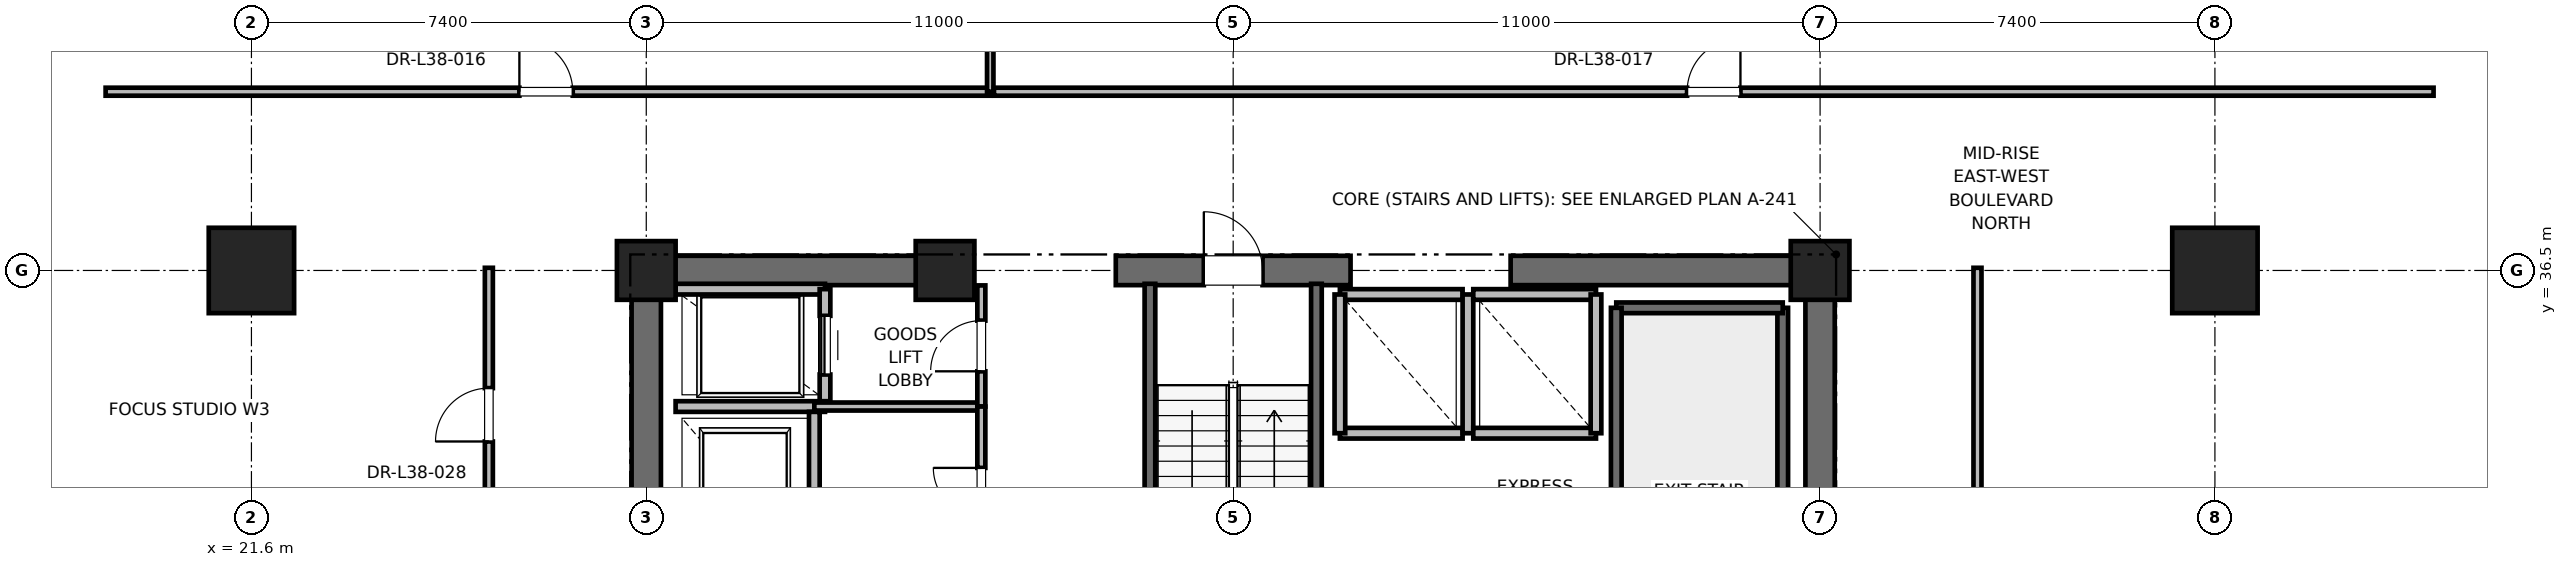
"""IFC4 building model, lengths in metres.
Left out: names, types, materials, properties, quantities, classifications, styles, units other than length and angle.
Written with IfcOpenShell. Run it as: python <this file> out.ifc"""

import sys

from ifc_helpers import new_model, si_unit, direction, frame, frame_2d, origin, origin_2d, place, context, subcontext, project, spatial, rectangle, extrude, element, fill, save


model = new_model("IFC4")
c1 = context("Model", 3, precision=1e-05, world=origin(), true_north=direction((0.0, 1.0)))
c2 = subcontext(c1, "Body", "Model", "MODEL_VIEW")
j1 = project(units=[si_unit("LENGTHUNIT", "METRE"), si_unit("PLANEANGLEUNIT", "RADIAN")], contexts=[c1])
p1 = place(None, origin())
s1 = spatial("IfcSite", under=j1, at=p1, CompositionType="ELEMENT")
p2 = place(p1, origin())
s2 = spatial("IfcBuilding", under=s1, at=p2, CompositionType="ELEMENT")
p3 = place(p2, frame((0.0, 0.0, 164.4)))
s3 = spatial("IfcBuildingStorey", under=s2, at=p3, CompositionType="ELEMENT", Elevation=164.4)
for number, where, z_axis, x_axis in (
    (1, (21.6, 36.5, 0.0), (0.0, 0.0, 1.0), (1.0, 0.0, 0.0)),
    (2, (58.4, 36.5, 0.0), (0.0, 0.0, 1.0), (1.0, 0.0, 0.0)),
):
    element("IfcColumn", number, at=place(p3, frame(where, z_axis=z_axis, x_axis=x_axis)), inside=s3, PredefinedType="COLUMN", context=c2, shape_type="SweptSolid", body=[
        extrude(rectangle(XDim=1.6, YDim=1.6, at=origin_2d()), origin(), (0.0, 0.0, 1.0), 4.0),
    ])
for number, where, z_axis, x_axis in (
    (3, (29.0, 36.5, 0.0), (0.0, 0.0, 1.0), (1.0, 0.0, 0.0)),
    (4, (51.0, 36.5, 0.0), (0.0, 0.0, 1.0), (1.0, 0.0, 0.0)),
    (5, (34.6, 36.5, 0.0), (0.0, 0.0, 1.0), (1.0, 0.0, 0.0)),
):
    element("IfcColumn", number, at=place(p3, frame(where, z_axis=z_axis, x_axis=x_axis)), inside=s3, PredefinedType="PILASTER", context=c2, shape_type="SweptSolid", body=[
        extrude(rectangle(XDim=1.1, YDim=1.1, at=origin_2d()), origin(), (0.0, 0.0, 1.0), 4.0),
    ])
p4 = place(p3, frame((29.0, 36.5, 0.0), z_axis=(0.0, 0.0, 1.0), x_axis=(1.0, 0.0, 0.0)))
e6 = element("IfcWall", 6, at=p4, inside=s3, PredefinedType="SHEAR", context=c2, shape_type="SweptSolid", body=[
    extrude(rectangle(XDim=5.8, YDim=0.55, at=frame_2d((2.9, 0.0))), origin(), (0.0, 0.0, 1.0), 3.775),
])
p5 = place(p3, frame((37.8, 36.5, 0.0), z_axis=(0.0, 0.0, 1.0), x_axis=(1.0, 0.0, 0.0)))
e7 = element("IfcWall", 7, at=p5, inside=s3, PredefinedType="SHEAR", context=c2, shape_type="SweptSolid", body=[
    extrude(rectangle(XDim=4.4, YDim=0.55, at=frame_2d((2.2, 0.0))), origin(), (0.0, 0.0, 1.0), 3.775),
])
p6 = place(p5, frame((1.65, 0.0, 0.0)))
e8 = element("IfcOpeningElement", 8, at=p6, cuts=e7, PredefinedType="OPENING", context=c2, shape_type="SweptSolid", body=[
    extrude(rectangle(XDim=1.1, YDim=2.15, at=frame_2d((0.55, 1.075))), frame((0.0, 0.275, 0.0), z_axis=(0.0, -1.0, 0.0), x_axis=(1.0, 0.0, 0.0)), (0.0, 0.0, 1.0), 0.55),
])
for number, where, z_axis, x_axis in (
    (9, (45.2, 36.5, 0.0), (0.0, 0.0, 1.0), (1.0, 0.0, 0.0)),
    (10, (29.0, 30.7, 0.0), (0.0, 0.0, 1.0), (0.0, 1.0, 0.0)),
):
    element("IfcWall", number, at=place(p3, frame(where, z_axis=z_axis, x_axis=x_axis)), inside=s3, PredefinedType="SHEAR", context=c2, shape_type="SweptSolid", body=[
        extrude(rectangle(XDim=5.8, YDim=0.55, at=frame_2d((2.9, 0.0))), origin(), (0.0, 0.0, 1.0), 3.775),
    ])
p7 = place(p3, frame((51.0, 27.7, 0.0), z_axis=(0.0, 0.0, 1.0), x_axis=(0.0, 1.0, 0.0)))
e11 = element("IfcWall", 11, at=p7, inside=s3, PredefinedType="SHEAR", context=c2, shape_type="SweptSolid", body=[
    extrude(rectangle(XDim=8.8, YDim=0.55, at=frame_2d((4.4, 0.0))), origin(), (0.0, 0.0, 1.0), 3.775),
])
p8 = place(p3, frame((50.3, 27.65, 0.0), z_axis=(0.0, 0.0, 1.0), x_axis=(0.0, 1.0, 0.0)))
e12 = element("IfcWall", 12, at=p8, inside=s3, PredefinedType="SOLIDWALL", context=c2, shape_type="SweptSolid", body=[
    extrude(rectangle(XDim=8.15, YDim=0.2, at=frame_2d((4.075, 0.0))), origin(), (0.0, 0.0, 1.0), 3.775),
])
p9 = place(p3, frame((47.18, 35.8, 0.0), z_axis=(0.0, 0.0, 1.0), x_axis=(1.0, 0.0, 0.0)))
e13 = element("IfcWall", 13, at=p9, inside=s3, PredefinedType="SOLIDWALL", context=c2, shape_type="SweptSolid", body=[
    extrude(rectangle(XDim=3.12, YDim=0.2, at=frame_2d((1.56, 0.0))), origin(), (0.0, 0.0, 1.0), 3.775),
])
p10 = place(p3, frame((47.18, 27.62, 0.0), z_axis=(0.0, 0.0, 1.0), x_axis=(0.0, 1.0, 0.0)))
e14 = element("IfcWall", 14, at=p10, inside=s3, PredefinedType="SOLIDWALL", context=c2, shape_type="SweptSolid", body=[
    extrude(rectangle(XDim=8.18, YDim=0.2, at=frame_2d((4.09, 0.0))), origin(), (0.0, 0.0, 1.0), 3.775),
])
p11 = place(p3, frame((38.44, 27.38, 0.0), z_axis=(0.0, 0.0, 1.0), x_axis=(0.0, 1.0, 0.0)))
e15 = element("IfcWall", 15, at=p11, inside=s3, PredefinedType="SOLIDWALL", context=c2, shape_type="SweptSolid", body=[
    extrude(rectangle(XDim=8.87, YDim=0.2, at=frame_2d((4.435, 0.0))), origin(), (0.0, 0.0, 1.0), 3.775),
])
p12 = place(p3, frame((41.56, 27.68, 0.0), z_axis=(0.0, 0.0, 1.0), x_axis=(0.0, 1.0, 0.0)))
e16 = element("IfcWall", 16, at=p12, inside=s3, PredefinedType="SOLIDWALL", context=c2, shape_type="SweptSolid", body=[
    extrude(rectangle(XDim=8.57, YDim=0.2, at=frame_2d((4.285, 0.0))), origin(), (0.0, 0.0, 1.0), 3.775),
])
p13 = place(p3, frame((29.55, 33.95, 0.0), z_axis=(0.0, 0.0, 1.0), x_axis=(1.0, 0.0, 0.0)))
e17 = element("IfcWall", 17, at=p13, inside=s3, PredefinedType="SOLIDWALL", context=c2, shape_type="SweptSolid", body=[
    extrude(rectangle(XDim=2.8, YDim=0.2, at=frame_2d((1.4, 0.0))), origin(), (0.0, 0.0, 1.0), 3.775),
])
p14 = place(p3, frame((32.15, 30.85, 0.0), z_axis=(0.0, 0.0, 1.0), x_axis=(0.0, 1.0, 0.0)))
e18 = element("IfcWall", 18, at=p14, inside=s3, PredefinedType="SOLIDWALL", context=c2, shape_type="SweptSolid", body=[
    extrude(rectangle(XDim=3.0, YDim=0.2, at=frame_2d((1.5, 0.0))), origin(), (0.0, 0.0, 1.0), 3.775),
])
p15 = place(p3, frame((32.35, 36.15, 0.0), z_axis=(0.0, 0.0, 1.0), x_axis=(-1.0, 0.0, 0.0)))
e19 = element("IfcWall", 19, at=p15, inside=s3, PredefinedType="SOLIDWALL", context=c2, shape_type="SweptSolid", body=[
    extrude(rectangle(XDim=2.8, YDim=0.2, at=frame_2d((1.4, 0.0))), origin(), (0.0, 0.0, 1.0), 2.985),
])
p16 = place(p3, frame((32.35, 34.05, 0.0), z_axis=(0.0, 0.0, 1.0), x_axis=(0.0, 1.0, 0.0)))
e20 = element("IfcWall", 20, at=p16, inside=s3, PredefinedType="SOLIDWALL", context=c2, shape_type="SweptSolid", body=[
    extrude(rectangle(XDim=2.1, YDim=0.2, at=frame_2d((1.05, 0.0))), origin(), (0.0, 0.0, 1.0), 3.775),
])
p17 = place(p16, frame((0.5, 0.0, 0.0)))
e21 = element("IfcOpeningElement", 21, at=p17, cuts=e20, PredefinedType="OPENING", context=c2, shape_type="SweptSolid", body=[
    extrude(rectangle(XDim=1.1, YDim=2.2, at=frame_2d((0.55, 1.1))), frame((0.0, 0.1, 0.0), z_axis=(0.0, -1.0, 0.0), x_axis=(1.0, 0.0, 0.0)), (0.0, 0.0, 1.0), 0.2),
])
p18 = place(p3, frame((42.0, 33.45, 0.0), z_axis=(0.0, 0.0, 1.0), x_axis=(1.0, 0.0, 0.0)))
e22 = element("IfcWall", 22, at=p18, inside=s3, PredefinedType="SOLIDWALL", context=c2, shape_type="SweptSolid", body=[
    extrude(rectangle(XDim=2.3, YDim=0.2, at=frame_2d((1.15, 0.0))), origin(), (0.0, 0.0, 1.0), 3.775),
])
p19 = place(p3, frame((44.3, 36.05, 0.0), z_axis=(0.0, 0.0, 1.0), x_axis=(-1.0, 0.0, 0.0)))
e23 = element("IfcWall", 23, at=p19, inside=s3, PredefinedType="SOLIDWALL", context=c2, shape_type="SweptSolid", body=[
    extrude(rectangle(XDim=2.3, YDim=0.2, at=frame_2d((1.15, 0.0))), origin(), (0.0, 0.0, 1.0), 2.755),
])
for number, where, z_axis, x_axis in (
    (24, (42.0, 36.05, 0.0), (0.0, 0.0, 1.0), (0.0, -1.0, 0.0)),
    (25, (44.4, 33.45, 0.0), (0.0, 0.0, 1.0), (0.0, 1.0, 0.0)),
):
    element("IfcWall", number, at=place(p3, frame(where, z_axis=z_axis, x_axis=x_axis)), inside=s3, PredefinedType="SOLIDWALL", context=c2, shape_type="SweptSolid", body=[
        extrude(rectangle(XDim=2.6, YDim=0.2, at=frame_2d((1.3, 0.0))), origin(), (0.0, 0.0, 1.0), 2.755),
    ])
p20 = place(p3, frame((44.5, 33.45, 0.0), z_axis=(0.0, 0.0, 1.0), x_axis=(1.0, 0.0, 0.0)))
e26 = element("IfcWall", 26, at=p20, inside=s3, PredefinedType="SOLIDWALL", context=c2, shape_type="SweptSolid", body=[
    extrude(rectangle(XDim=2.3, YDim=0.2, at=frame_2d((1.15, 0.0))), origin(), (0.0, 0.0, 1.0), 3.775),
])
p21 = place(p3, frame((46.8, 36.05, 0.0), z_axis=(0.0, 0.0, 1.0), x_axis=(-1.0, 0.0, 0.0)))
e27 = element("IfcWall", 27, at=p21, inside=s3, PredefinedType="SOLIDWALL", context=c2, shape_type="SweptSolid", body=[
    extrude(rectangle(XDim=2.3, YDim=0.2, at=frame_2d((1.15, 0.0))), origin(), (0.0, 0.0, 1.0), 2.755),
])
p22 = place(p3, frame((46.8, 33.45, 0.0), z_axis=(0.0, 0.0, 1.0), x_axis=(0.0, 1.0, 0.0)))
e28 = element("IfcWall", 28, at=p22, inside=s3, PredefinedType="SOLIDWALL", context=c2, shape_type="SweptSolid", body=[
    extrude(rectangle(XDim=2.6, YDim=0.2, at=frame_2d((1.3, 0.0))), origin(), (0.0, 0.0, 1.0), 3.775),
])
p23 = place(p3, frame((32.15, 33.95, 0.0), z_axis=(0.0, 0.0, 1.0), x_axis=(1.0, 0.0, 0.0)))
e29 = element("IfcWall", 29, at=p23, inside=s3, PredefinedType="PARTITIONING", context=c2, shape_type="SweptSolid", body=[
    extrude(rectangle(XDim=3.13, YDim=0.15, at=frame_2d((1.565, 0.0))), origin(), (0.0, 0.0, 1.0), 2.85),
])
p24 = place(p3, frame((35.28, 33.95, 0.0), z_axis=(0.0, 0.0, 1.0), x_axis=(0.0, 1.0, 0.0)))
e30 = element("IfcWall", 30, at=p24, inside=s3, PredefinedType="PARTITIONING", context=c2, shape_type="SweptSolid", body=[
    extrude(rectangle(XDim=2.27, YDim=0.15, at=frame_2d((1.135, 0.0))), origin(), (0.0, 0.0, 1.0), 2.755),
])
p25 = place(p24, frame((0.66, 0.0, 0.0)))
e31 = element("IfcOpeningElement", 31, at=p25, cuts=e30, PredefinedType="OPENING", context=c2, shape_type="SweptSolid", body=[
    extrude(rectangle(XDim=0.95, YDim=2.15, at=frame_2d((0.475, 1.075))), frame((0.0, 0.075, 0.0), z_axis=(0.0, -1.0, 0.0), x_axis=(1.0, 0.0, 0.0)), (0.0, 0.0, 1.0), 0.15),
])
p26 = place(p3, frame((35.28, 30.75, 0.0), z_axis=(0.0, 0.0, 1.0), x_axis=(0.0, 1.0, 0.0)))
e32 = element("IfcWall", 32, at=p26, inside=s3, PredefinedType="PARTITIONING", context=c2, shape_type="SweptSolid", body=[
    extrude(rectangle(XDim=3.2, YDim=0.15, at=frame_2d((1.6, 0.0))), origin(), (0.0, 0.0, 1.0), 2.85),
])
p27 = place(p26, frame((1.15, 0.0, 0.0)))
e33 = element("IfcOpeningElement", 33, at=p27, cuts=e32, PredefinedType="OPENING", context=c2, shape_type="SweptSolid", body=[
    extrude(rectangle(XDim=0.9, YDim=2.1, at=frame_2d((0.45, 1.05))), frame((0.0, 0.075, 0.0), z_axis=(0.0, -1.0, 0.0), x_axis=(1.0, 0.0, 0.0)), (0.0, 0.0, 1.0), 0.15),
])
p28 = place(p3, frame((18.867, 39.85, 0.0), z_axis=(0.0, 0.0, 1.0), x_axis=(1.0, 0.0, 0.0)))
e34 = element("IfcWall", 34, at=p28, inside=s3, PredefinedType="PARTITIONING", context=c2, shape_type="SweptSolid", body=[
    extrude(rectangle(XDim=16.58, YDim=0.15, at=frame_2d((8.29, 0.0))), origin(), (0.0, 0.0, 1.0), 2.85),
])
p29 = place(p28, frame((7.755, 0.0, 0.0)))
e35 = element("IfcOpeningElement", 35, at=p29, cuts=e34, PredefinedType="OPENING", context=c2, shape_type="SweptSolid", body=[
    extrude(rectangle(XDim=1.0, YDim=2.15, at=frame_2d((0.5, 1.075))), frame((0.0, 0.075, 0.0), z_axis=(0.0, -1.0, 0.0), x_axis=(1.0, 0.0, 0.0)), (0.0, 0.0, 1.0), 0.15),
])
p30 = place(p3, frame((35.447, 39.85, 0.0), z_axis=(0.0, 0.0, 1.0), x_axis=(0.0, 1.0, 0.0)))
e36 = element("IfcWall", 36, at=p30, inside=s3, PredefinedType="PARTITIONING", context=c2, shape_type="SweptSolid", body=[
    extrude(rectangle(XDim=9.523, YDim=0.12, at=frame_2d((4.761, 0.0))), origin(), (0.0, 0.0, 1.0), 2.405),
])
p31 = place(p3, frame((35.517, 39.85, 0.0), z_axis=(0.0, 0.0, 1.0), x_axis=(1.0, 0.0, 0.0)))
e37 = element("IfcWall", 37, at=p31, inside=s3, PredefinedType="PARTITIONING", context=c2, shape_type="SweptSolid", body=[
    extrude(rectangle(XDim=26.981, YDim=0.15, at=frame_2d((13.491, 0.0))), origin(), (0.0, 0.0, 1.0), 2.85),
])
p32 = place(p31, frame((12.99, 0.0, 0.0)))
e38 = element("IfcOpeningElement", 38, at=p32, cuts=e37, PredefinedType="OPENING", context=c2, shape_type="SweptSolid", body=[
    extrude(rectangle(XDim=1.0, YDim=2.15, at=frame_2d((0.5, 1.075))), frame((0.0, 0.075, 0.0), z_axis=(0.0, -1.0, 0.0), x_axis=(1.0, 0.0, 0.0)), (0.0, 0.0, 1.0), 0.15),
])
p33 = place(p3, frame((26.05, 31.19, 0.0), z_axis=(0.0, 0.0, 1.0), x_axis=(0.0, 1.0, 0.0)))
e39 = element("IfcWall", 39, at=p33, inside=s3, PredefinedType="PARTITIONING", context=c2, shape_type="SweptSolid", body=[
    extrude(rectangle(XDim=5.36, YDim=0.15, at=frame_2d((2.68, 0.0))), origin(), (0.0, 0.0, 1.0), 2.85),
])
p34 = place(p33, frame((2.105, 0.0, 0.0)))
e40 = element("IfcOpeningElement", 40, at=p34, cuts=e39, PredefinedType="OPENING", context=c2, shape_type="SweptSolid", body=[
    extrude(rectangle(XDim=1.0, YDim=2.15, at=frame_2d((0.5, 1.075))), frame((0.0, 0.075, 0.0), z_axis=(0.0, -1.0, 0.0), x_axis=(1.0, 0.0, 0.0)), (0.0, 0.0, 1.0), 0.15),
])
p35 = place(p3, frame((53.95, 26.122, 0.0), z_axis=(0.0, 0.0, 1.0), x_axis=(0.0, 1.0, 0.0)))
e41 = element("IfcWall", 41, at=p35, inside=s3, PredefinedType="PARTITIONING", context=c2, shape_type="SweptSolid", body=[
    extrude(rectangle(XDim=10.428, YDim=0.15, at=frame_2d((5.214, 0.0))), origin(), (0.0, 0.0, 1.0), 2.85),
])
p36 = place(p35, frame((4.639, 0.0, 0.0)))
e42 = element("IfcOpeningElement", 42, at=p36, cuts=e41, PredefinedType="OPENING", context=c2, shape_type="SweptSolid", body=[
    extrude(rectangle(XDim=1.0, YDim=2.15, at=frame_2d((0.5, 1.075))), frame((0.0, 0.075, 0.0), z_axis=(0.0, -1.0, 0.0), x_axis=(1.0, 0.0, 0.0)), (0.0, 0.0, 1.0), 0.15),
])
p37 = place(p6, origin())
e43 = element("IfcDoor", 43, at=p37, inside=s3, OperationType="SINGLE_SWING_LEFT", PredefinedType="DOOR", context=c2, shape_type="SweptSolid", body=[
    extrude(rectangle(XDim=1.1, YDim=2.15, at=frame_2d((0.55, 1.075))), frame((0.0, 0.025, 0.0), z_axis=(0.0, -1.0, 0.0), x_axis=(1.0, 0.0, 0.0)), (0.0, 0.0, 1.0), 0.05),
])
fill(e8, e43)
p38 = place(p17, origin())
e44 = element("IfcDoor", 44, at=p38, inside=s3, OperationType="SLIDING_TO_RIGHT", PredefinedType="DOOR", context=c2, shape_type="SweptSolid", body=[
    extrude(rectangle(XDim=1.1, YDim=2.2, at=frame_2d((0.55, 1.1))), frame((0.0, 0.025, 0.0), z_axis=(0.0, -1.0, 0.0), x_axis=(1.0, 0.0, 0.0)), (0.0, 0.0, 1.0), 0.05),
])
fill(e21, e44)
p39 = place(p25, origin())
e45 = element("IfcDoor", 45, at=p39, inside=s3, OperationType="SINGLE_SWING_LEFT", PredefinedType="DOOR", context=c2, shape_type="SweptSolid", body=[
    extrude(rectangle(XDim=0.95, YDim=2.15, at=frame_2d((0.475, 1.075))), frame((0.0, 0.025, 0.0), z_axis=(0.0, -1.0, 0.0), x_axis=(1.0, 0.0, 0.0)), (0.0, 0.0, 1.0), 0.05),
])
fill(e31, e45)
p40 = place(p27, origin())
e46 = element("IfcDoor", 46, at=p40, inside=s3, OperationType="SINGLE_SWING_RIGHT", PredefinedType="DOOR", context=c2, shape_type="SweptSolid", body=[
    extrude(rectangle(XDim=0.9, YDim=2.1, at=frame_2d((0.45, 1.05))), frame((0.0, 0.025, 0.0), z_axis=(0.0, -1.0, 0.0), x_axis=(1.0, 0.0, 0.0)), (0.0, 0.0, 1.0), 0.05),
])
fill(e33, e46)
p41 = place(p29, origin())
e47 = element("IfcDoor", 47, at=p41, inside=s3, OperationType="SINGLE_SWING_LEFT", PredefinedType="DOOR", context=c2, shape_type="SweptSolid", body=[
    extrude(rectangle(XDim=1.0, YDim=2.15, at=frame_2d((0.5, 1.075))), frame((0.0, 0.025, 0.0), z_axis=(0.0, -1.0, 0.0), x_axis=(1.0, 0.0, 0.0)), (0.0, 0.0, 1.0), 0.05),
])
fill(e35, e47)
p42 = place(p32, origin())
e48 = element("IfcDoor", 48, at=p42, inside=s3, OperationType="SINGLE_SWING_RIGHT", PredefinedType="DOOR", context=c2, shape_type="SweptSolid", body=[
    extrude(rectangle(XDim=1.0, YDim=2.15, at=frame_2d((0.5, 1.075))), frame((0.0, 0.025, 0.0), z_axis=(0.0, -1.0, 0.0), x_axis=(1.0, 0.0, 0.0)), (0.0, 0.0, 1.0), 0.05),
])
fill(e38, e48)
p43 = place(p34, origin())
e49 = element("IfcDoor", 49, at=p43, inside=s3, OperationType="SINGLE_SWING_LEFT", PredefinedType="DOOR", context=c2, shape_type="SweptSolid", body=[
    extrude(rectangle(XDim=1.0, YDim=2.15, at=frame_2d((0.5, 1.075))), frame((0.0, 0.025, 0.0), z_axis=(0.0, -1.0, 0.0), x_axis=(1.0, 0.0, 0.0)), (0.0, 0.0, 1.0), 0.05),
])
fill(e40, e49)
save(model, sys.argv[1])
